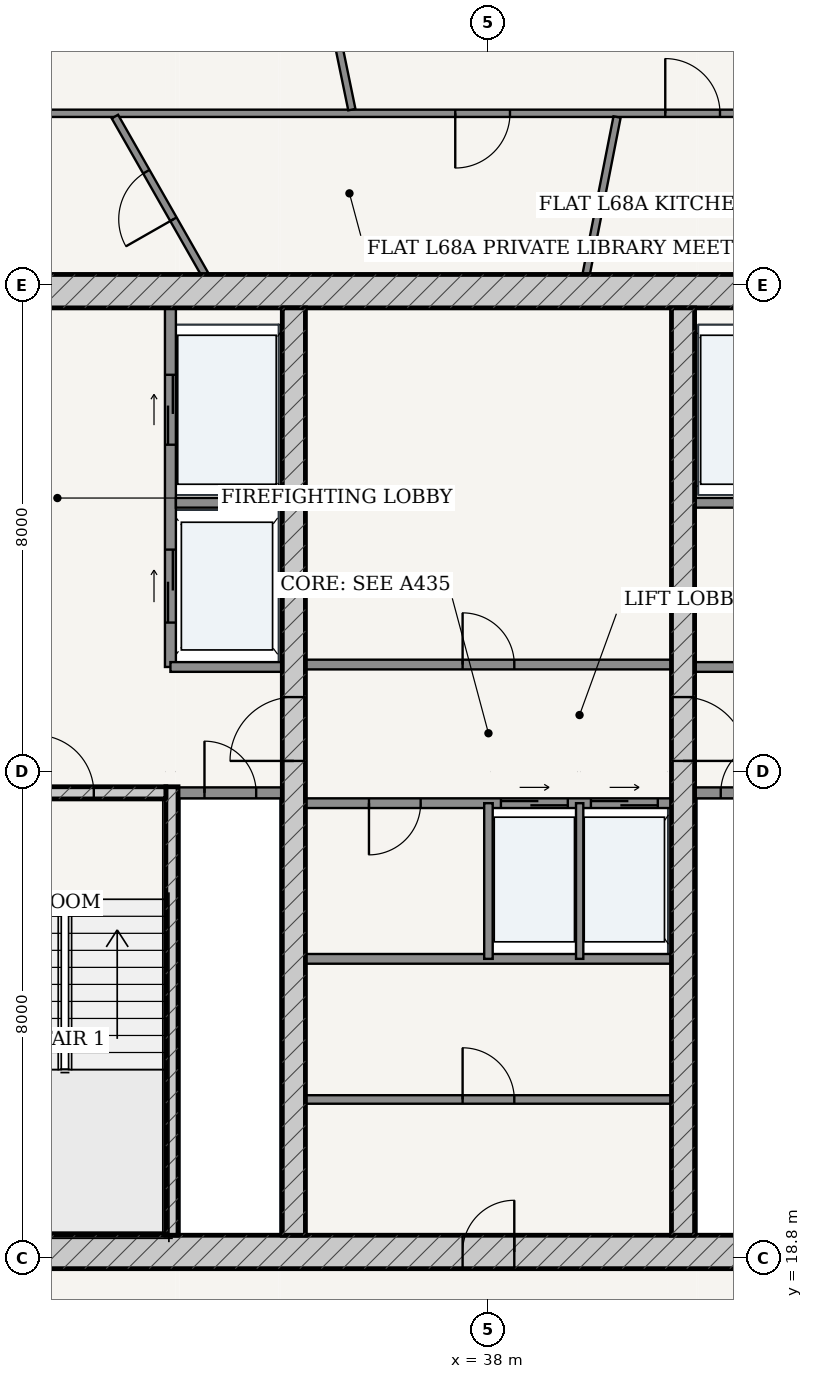
"""IFC4 building model, lengths in metres.
Left out: names, types, materials, properties, quantities, classifications, styles, units other than length and angle.
Written with IfcOpenShell. Run it as: python <this file> out.ifc"""

import sys

from ifc_helpers import new_model, si_unit, direction, frame, frame_2d, origin, place, context, subcontext, project, spatial, rectangle, extrude, source, transform, mapped, element, fill, save


model = new_model("IFC4")
c1 = context("Model", 3, precision=1e-05, world=origin(), true_north=direction((-0.2419218956, 0.970295726276)))
c2 = subcontext(c1, "Body", "Model", "MODEL_VIEW")
j1 = project(units=[si_unit("LENGTHUNIT", "METRE"), si_unit("PLANEANGLEUNIT", "RADIAN")], contexts=[c1])
p1 = place(None, origin())
s1 = spatial("IfcSite", under=j1, at=p1, CompositionType="ELEMENT")
p2 = place(p1, origin())
s2 = spatial("IfcBuilding", under=s1, at=p2, CompositionType="ELEMENT")
p3 = place(p2, frame((0.0, 0.0, 259.45)))
s3 = spatial("IfcBuildingStorey", under=s2, at=p3, CompositionType="ELEMENT", Elevation=259.45)
p4 = place(p3, frame((28.825, 18.9, 0.0), z_axis=(0.0, 0.0, 1.0), x_axis=(1.0, 0.0, 0.0)))
e1 = element("IfcWall", 1, at=p4, inside=s3, PredefinedType="SHEAR", context=c2, shape_type="SweptSolid", body=[
    extrude(rectangle(XDim=18.35, YDim=0.55, at=frame_2d((9.175, 0.0))), origin(), (0.0, 0.0, 1.0), 3.49),
])
p5 = place(p4, frame((8.75, 0.0, 0.0)))
e2 = element("IfcOpeningElement", 2, at=p5, cuts=e1, PredefinedType="OPENING", context=c2, shape_type="SweptSolid", body=[
    extrude(rectangle(XDim=0.85, YDim=2.1, at=frame_2d((0.425, 1.05))), frame((0.0, 0.285, 0.0), z_axis=(0.0, -1.0, 0.0), x_axis=(1.0, 0.0, 0.0)), (0.0, 0.0, 1.0), 0.57),
])
p6 = place(p3, frame((28.825, 34.7, 0.0), z_axis=(0.0, 0.0, 1.0), x_axis=(1.0, 0.0, 0.0)))
e3 = element("IfcWall", 3, at=p6, inside=s3, PredefinedType="SHEAR", context=c2, shape_type="SweptSolid", body=[
    extrude(rectangle(XDim=18.35, YDim=0.55, at=frame_2d((9.175, 0.0))), origin(), (0.0, 0.0, 1.0), 3.49),
])
p7 = place(p3, frame((32.795, 19.175, 0.0), z_axis=(0.0, 0.0, 1.0), x_axis=(0.0, 1.0, 0.0)))
e4 = element("IfcWall", 4, at=p7, inside=s3, PredefinedType="SOLIDWALL", context=c2, shape_type="SweptSolid", body=[
    extrude(rectangle(XDim=7.375, YDim=0.2, at=frame_2d((3.688, 0.0))), origin(), (0.0, 0.0, 1.0), 3.49),
])
p8 = place(p3, frame((29.375, 26.45, 0.0), z_axis=(0.0, 0.0, 1.0), x_axis=(1.0, 0.0, 0.0)))
e5 = element("IfcWall", 5, at=p8, inside=s3, PredefinedType="SOLIDWALL", context=c2, shape_type="SweptSolid", body=[
    extrude(rectangle(XDim=3.32, YDim=0.2, at=frame_2d((1.66, 0.0))), origin(), (0.0, 0.0, 1.0), 3.49),
])
p9 = place(p8, frame((1.185, 0.0, 0.0)))
e6 = element("IfcOpeningElement", 6, at=p9, cuts=e5, PredefinedType="OPENING", context=c2, shape_type="SweptSolid", body=[
    extrude(rectangle(XDim=0.95, YDim=2.15, at=frame_2d((0.475, 1.075))), frame((0.0, 0.11, 0.0), z_axis=(0.0, -1.0, 0.0), x_axis=(1.0, 0.0, 0.0)), (0.0, 0.0, 1.0), 0.22),
])
p10 = place(p3, frame((34.8, 19.175, 0.0), z_axis=(0.0, 0.0, 1.0), x_axis=(0.0, 1.0, 0.0)))
e7 = element("IfcWall", 7, at=p10, inside=s3, PredefinedType="SHEAR", context=c2, shape_type="SweptSolid", body=[
    extrude(rectangle(XDim=15.25, YDim=0.38, at=frame_2d((7.625, 0.0))), origin(), (0.0, 0.0, 1.0), 3.49),
])
p11 = place(p10, frame((7.8, 0.0, 0.0)))
e8 = element("IfcOpeningElement", 8, at=p11, cuts=e7, PredefinedType="OPENING", context=c2, shape_type="SweptSolid", body=[
    extrude(rectangle(XDim=1.05, YDim=2.15, at=frame_2d((0.525, 1.075))), frame((0.0, 0.2, 0.0), z_axis=(0.0, -1.0, 0.0), x_axis=(1.0, 0.0, 0.0)), (0.0, 0.0, 1.0), 0.4),
])
p12 = place(p3, frame((41.2, 19.175, 0.0), z_axis=(0.0, 0.0, 1.0), x_axis=(0.0, 1.0, 0.0)))
e9 = element("IfcWall", 9, at=p12, inside=s3, PredefinedType="SHEAR", context=c2, shape_type="SweptSolid", body=[
    extrude(rectangle(XDim=15.25, YDim=0.38, at=frame_2d((7.625, 0.0))), origin(), (0.0, 0.0, 1.0), 3.49),
])
p13 = place(p12, frame((7.8, 0.0, 0.0)))
e10 = element("IfcOpeningElement", 10, at=p13, cuts=e9, PredefinedType="OPENING", context=c2, shape_type="SweptSolid", body=[
    extrude(rectangle(XDim=1.05, YDim=2.15, at=frame_2d((0.525, 1.075))), frame((0.0, 0.2, 0.0), z_axis=(0.0, -1.0, 0.0), x_axis=(1.0, 0.0, 0.0)), (0.0, 0.0, 1.0), 0.4),
])
p14 = place(p3, frame((32.9, 26.45, 0.0), z_axis=(0.0, 0.0, 1.0), x_axis=(1.0, 0.0, 0.0)))
e11 = element("IfcWall", 11, at=p14, inside=s3, PredefinedType="PARTITIONING", context=c2, shape_type="SweptSolid", body=[
    extrude(rectangle(XDim=1.71, YDim=0.18, at=frame_2d((0.855, 0.0))), origin(), (0.0, 0.0, 1.0), 3.49),
])
p15 = place(p14, frame((0.43, 0.0, 0.0)))
e12 = element("IfcOpeningElement", 12, at=p15, cuts=e11, PredefinedType="OPENING", context=c2, shape_type="SweptSolid", body=[
    extrude(rectangle(XDim=0.85, YDim=2.1, at=frame_2d((0.425, 1.05))), frame((0.0, 0.1, 0.0), z_axis=(0.0, -1.0, 0.0), x_axis=(1.0, 0.0, 0.0)), (0.0, 0.0, 1.0), 0.2),
])
p16 = place(p3, frame((41.39, 26.45, 0.0), z_axis=(0.0, 0.0, 1.0), x_axis=(1.0, 0.0, 0.0)))
e13 = element("IfcWall", 13, at=p16, inside=s3, PredefinedType="PARTITIONING", context=c2, shape_type="SweptSolid", body=[
    extrude(rectangle(XDim=1.71, YDim=0.18, at=frame_2d((0.855, 0.0))), origin(), (0.0, 0.0, 1.0), 3.49),
])
p17 = place(p16, frame((0.43, 0.0, 0.0)))
e14 = element("IfcOpeningElement", 14, at=p17, cuts=e13, PredefinedType="OPENING", context=c2, shape_type="SweptSolid", body=[
    extrude(rectangle(XDim=0.85, YDim=2.1, at=frame_2d((0.425, 1.05))), frame((0.0, 0.1, 0.0), z_axis=(0.0, -1.0, 0.0), x_axis=(1.0, 0.0, 0.0)), (0.0, 0.0, 1.0), 0.2),
])
p18 = place(p3, frame((32.77, 28.52, 0.0), z_axis=(0.0, 0.0, 1.0), x_axis=(0.0, 1.0, 0.0)))
e15 = element("IfcWall", 15, at=p18, inside=s3, PredefinedType="PARTITIONING", context=c2, shape_type="SweptSolid", body=[
    extrude(rectangle(XDim=5.905, YDim=0.18, at=frame_2d((2.953, 0.0))), origin(), (0.0, 0.0, 1.0), 3.49),
])
p19 = place(p18, frame((3.655, 0.0, 0.0)))
e16 = element("IfcOpeningElement", 16, at=p19, cuts=e15, PredefinedType="OPENING", context=c2, shape_type="SweptSolid", body=[
    extrude(rectangle(XDim=1.15, YDim=2.2, at=frame_2d((0.575, 1.1))), frame((0.0, 0.1, 0.0), z_axis=(0.0, -1.0, 0.0), x_axis=(1.0, 0.0, 0.0)), (0.0, 0.0, 1.0), 0.2),
])
p20 = place(p18, frame((0.73, 0.0, 0.0)))
e17 = element("IfcOpeningElement", 17, at=p20, cuts=e15, PredefinedType="OPENING", context=c2, shape_type="SweptSolid", body=[
    extrude(rectangle(XDim=1.2, YDim=2.25, at=frame_2d((0.6, 1.125))), frame((0.0, 0.1, 0.0), z_axis=(0.0, -1.0, 0.0), x_axis=(1.0, 0.0, 0.0)), (0.0, 0.0, 1.0), 0.2),
])
p21 = place(p3, frame((32.86, 31.22, 0.0), z_axis=(0.0, 0.0, 1.0), x_axis=(1.0, 0.0, 0.0)))
e18 = element("IfcWall", 18, at=p21, inside=s3, PredefinedType="PARTITIONING", context=c2, shape_type="SweptSolid", body=[
    extrude(rectangle(XDim=1.75, YDim=0.16, at=frame_2d((0.875, 0.0))), origin(), (0.0, 0.0, 1.0), 3.49),
])
p22 = place(p3, frame((32.77, 28.52, 0.0), z_axis=(0.0, 0.0, 1.0), x_axis=(1.0, 0.0, 0.0)))
e19 = element("IfcWall", 19, at=p22, inside=s3, PredefinedType="PARTITIONING", context=c2, shape_type="SweptSolid", body=[
    extrude(rectangle(XDim=1.84, YDim=0.16, at=frame_2d((0.92, 0.0))), origin(), (0.0, 0.0, 1.0), 3.49),
])
p23 = place(p3, frame((41.39, 31.22, 0.0), z_axis=(0.0, 0.0, 1.0), x_axis=(1.0, 0.0, 0.0)))
e20 = element("IfcWall", 20, at=p23, inside=s3, PredefinedType="PARTITIONING", context=c2, shape_type="SweptSolid", body=[
    extrude(rectangle(XDim=1.75, YDim=0.16, at=frame_2d((0.875, 0.0))), origin(), (0.0, 0.0, 1.0), 3.49),
])
p24 = place(p3, frame((41.39, 28.52, 0.0), z_axis=(0.0, 0.0, 1.0), x_axis=(1.0, 0.0, 0.0)))
e21 = element("IfcWall", 21, at=p24, inside=s3, PredefinedType="PARTITIONING", context=c2, shape_type="SweptSolid", body=[
    extrude(rectangle(XDim=1.84, YDim=0.16, at=frame_2d((0.92, 0.0))), origin(), (0.0, 0.0, 1.0), 3.49),
])
p25 = place(p3, frame((34.99, 28.56, 0.0), z_axis=(0.0, 0.0, 1.0), x_axis=(1.0, 0.0, 0.0)))
e22 = element("IfcWall", 22, at=p25, inside=s3, PredefinedType="PARTITIONING", context=c2, shape_type="SweptSolid", body=[
    extrude(rectangle(XDim=6.02, YDim=0.16, at=frame_2d((3.01, 0.0))), origin(), (0.0, 0.0, 1.0), 3.49),
])
p26 = place(p25, frame((2.585, 0.0, 0.0)))
e23 = element("IfcOpeningElement", 23, at=p26, cuts=e22, PredefinedType="OPENING", context=c2, shape_type="SweptSolid", body=[
    extrude(rectangle(XDim=0.85, YDim=2.1, at=frame_2d((0.425, 1.05))), frame((0.0, 0.09, 0.0), z_axis=(0.0, -1.0, 0.0), x_axis=(1.0, 0.0, 0.0)), (0.0, 0.0, 1.0), 0.18),
])
p27 = place(p3, frame((34.99, 26.28, 0.0), z_axis=(0.0, 0.0, 1.0), x_axis=(1.0, 0.0, 0.0)))
e24 = element("IfcWall", 24, at=p27, inside=s3, PredefinedType="PARTITIONING", context=c2, shape_type="SweptSolid", body=[
    extrude(rectangle(XDim=6.02, YDim=0.16, at=frame_2d((3.01, 0.0))), origin(), (0.0, 0.0, 1.0), 3.49),
])
p28 = place(p27, frame((1.045, 0.0, 0.0)))
e25 = element("IfcOpeningElement", 25, at=p28, cuts=e24, PredefinedType="OPENING", context=c2, shape_type="SweptSolid", body=[
    extrude(rectangle(XDim=0.85, YDim=2.1, at=frame_2d((0.425, 1.05))), frame((0.0, 0.09, 0.0), z_axis=(0.0, -1.0, 0.0), x_axis=(1.0, 0.0, 0.0)), (0.0, 0.0, 1.0), 0.18),
])
p29 = place(p27, frame((3.215, 0.0, 0.0)))
e26 = element("IfcOpeningElement", 26, at=p29, cuts=e24, PredefinedType="OPENING", context=c2, shape_type="SweptSolid", body=[
    extrude(rectangle(XDim=1.1, YDim=2.2, at=frame_2d((0.55, 1.1))), frame((0.0, 0.09, 0.0), z_axis=(0.0, -1.0, 0.0), x_axis=(1.0, 0.0, 0.0)), (0.0, 0.0, 1.0), 0.18),
])
p30 = place(p27, frame((4.695, 0.0, 0.0)))
e27 = element("IfcOpeningElement", 27, at=p30, cuts=e24, PredefinedType="OPENING", context=c2, shape_type="SweptSolid", body=[
    extrude(rectangle(XDim=1.1, YDim=2.2, at=frame_2d((0.55, 1.1))), frame((0.0, 0.09, 0.0), z_axis=(0.0, -1.0, 0.0), x_axis=(1.0, 0.0, 0.0)), (0.0, 0.0, 1.0), 0.18),
])
p31 = place(p3, frame((34.99, 23.72, 0.0), z_axis=(0.0, 0.0, 1.0), x_axis=(1.0, 0.0, 0.0)))
e28 = element("IfcWall", 28, at=p31, inside=s3, PredefinedType="PARTITIONING", context=c2, shape_type="SweptSolid", body=[
    extrude(rectangle(XDim=6.02, YDim=0.16, at=frame_2d((3.01, 0.0))), origin(), (0.0, 0.0, 1.0), 3.49),
])
p32 = place(p3, frame((38.0, 23.72, 0.0), z_axis=(0.0, 0.0, 1.0), x_axis=(0.0, 1.0, 0.0)))
e29 = element("IfcWall", 29, at=p32, inside=s3, PredefinedType="PARTITIONING", context=c2, shape_type="SweptSolid", body=[
    extrude(rectangle(XDim=2.56, YDim=0.14, at=frame_2d((1.28, 0.0))), origin(), (0.0, 0.0, 1.0), 3.49),
])
p33 = place(p3, frame((39.5, 23.72, 0.0), z_axis=(0.0, 0.0, 1.0), x_axis=(0.0, 1.0, 0.0)))
e30 = element("IfcWall", 30, at=p33, inside=s3, PredefinedType="PARTITIONING", context=c2, shape_type="SweptSolid", body=[
    extrude(rectangle(XDim=2.56, YDim=0.12, at=frame_2d((1.28, 0.0))), origin(), (0.0, 0.0, 1.0), 3.49),
])
p34 = place(p3, frame((34.99, 21.407, 0.0), z_axis=(0.0, 0.0, 1.0), x_axis=(1.0, 0.0, 0.0)))
e31 = element("IfcWall", 31, at=p34, inside=s3, PredefinedType="PARTITIONING", context=c2, shape_type="SweptSolid", body=[
    extrude(rectangle(XDim=6.02, YDim=0.14, at=frame_2d((3.01, 0.0))), origin(), (0.0, 0.0, 1.0), 3.49),
])
p35 = place(p34, frame((2.585, 0.0, 0.0)))
e32 = element("IfcOpeningElement", 32, at=p35, cuts=e31, PredefinedType="OPENING", context=c2, shape_type="SweptSolid", body=[
    extrude(rectangle(XDim=0.85, YDim=2.1, at=frame_2d((0.425, 1.05))), frame((0.0, 0.08, 0.0), z_axis=(0.0, -1.0, 0.0), x_axis=(1.0, 0.0, 0.0)), (0.0, 0.0, 1.0), 0.16),
])
p36 = place(p3, frame((26.175, 37.625, 0.0), z_axis=(0.0, 0.0, 1.0), x_axis=(1.0, 0.0, 0.0)))
e33 = element("IfcWall", 33, at=p36, inside=s3, PredefinedType="PARTITIONING", context=c2, shape_type="SweptSolid", body=[
    extrude(rectangle(XDim=23.65, YDim=0.12, at=frame_2d((11.825, 0.0))), origin(), (0.0, 0.0, 1.0), 3.015),
])
p37 = place(p36, frame((14.733, 0.0, 0.0)))
e34 = element("IfcOpeningElement", 34, at=p37, cuts=e33, PredefinedType="OPENING", context=c2, shape_type="SweptSolid", body=[
    extrude(rectangle(XDim=0.9, YDim=2.15, at=frame_2d((0.45, 1.075))), frame((0.0, 0.07, 0.0), z_axis=(0.0, -1.0, 0.0), x_axis=(1.0, 0.0, 0.0)), (0.0, 0.0, 1.0), 0.14),
])
p38 = place(p36, frame((11.279, 0.0, 0.0)))
e35 = element("IfcOpeningElement", 35, at=p38, cuts=e33, PredefinedType="OPENING", context=c2, shape_type="SweptSolid", body=[
    extrude(rectangle(XDim=0.9, YDim=2.15, at=frame_2d((0.45, 1.075))), frame((0.0, 0.07, 0.0), z_axis=(0.0, -1.0, 0.0), x_axis=(1.0, 0.0, 0.0)), (0.0, 0.0, 1.0), 0.14),
])
p39 = place(p36, frame((2.678, 0.0, 0.0)))
e36 = element("IfcOpeningElement", 36, at=p39, cuts=e33, PredefinedType="OPENING", context=c2, shape_type="SweptSolid", body=[
    extrude(rectangle(XDim=0.9, YDim=2.15, at=frame_2d((0.45, 1.075))), frame((0.0, 0.07, 0.0), z_axis=(0.0, -1.0, 0.0), x_axis=(1.0, 0.0, 0.0)), (0.0, 0.0, 1.0), 0.14),
])
p40 = place(p3, frame((35.754, 37.686, 0.0), z_axis=(0.0, 0.0, 1.0), x_axis=(-0.202105877204, 0.979363678313, 0.0)))
e37 = element("IfcWall", 37, at=p40, inside=s3, PredefinedType="PARTITIONING", context=c2, shape_type="SweptSolid", body=[
    extrude(rectangle(XDim=7.512, YDim=0.12, at=frame_2d((3.756, 0.0))), origin(), (0.0, 0.0, 1.0), 3.015),
])
p41 = place(p3, frame((39.607, 34.977, 0.0), z_axis=(0.0, 0.0, 1.0), x_axis=(0.192785105701, 0.981241001497, 0.0)))
e38 = element("IfcWall", 38, at=p41, inside=s3, PredefinedType="PARTITIONING", context=c2, shape_type="SweptSolid", body=[
    extrude(rectangle(XDim=2.637, YDim=0.12, at=frame_2d((1.318, 0.0))), origin(), (0.0, 0.0, 1.0), 2.575),
])
p42 = place(p3, frame((33.336, 34.977, 0.0), z_axis=(0.0, 0.0, 1.0), x_axis=(-0.495399243909, 0.868665406894, 0.0)))
e39 = element("IfcWall", 39, at=p42, inside=s3, PredefinedType="PARTITIONING", context=c2, shape_type="SweptSolid", body=[
    extrude(rectangle(XDim=2.987, YDim=0.12, at=frame_2d((1.493, 0.0))), origin(), (0.0, 0.0, 1.0), 3.49),
])
p43 = place(p42, frame((1.043, 0.0, 0.0)))
e40 = element("IfcOpeningElement", 40, at=p43, cuts=e39, PredefinedType="OPENING", context=c2, shape_type="SweptSolid", body=[
    extrude(rectangle(XDim=0.9, YDim=2.15, at=frame_2d((0.45, 1.075))), frame((0.0, 0.07, 0.0), z_axis=(0.0, -1.0, 0.0), x_axis=(1.0, 0.0, 0.0)), (0.0, 0.0, 1.0), 0.14),
])
m1 = source(origin(), c2, "Body", "SweptSolid", [
    extrude(rectangle(XDim=1.05, YDim=2.15, at=frame_2d((0.525, 1.075))), frame((0.0, 0.025, 0.0), z_axis=(0.0, -1.0, 0.0), x_axis=(1.0, 0.0, 0.0)), (0.0, 0.0, 1.0), 0.05),
])
p44 = place(p11, origin())
e41 = element("IfcDoor", 41, at=p44, inside=s3, OperationType="SINGLE_SWING_LEFT", PredefinedType="DOOR", context=c2, shape_type="MappedRepresentation", body=[
    mapped(m1, transform((0.0, 0.0, 0.0), scale=1.0)),
])
fill(e8, e41)
p45 = place(p13, frame((1.05, 0.0, 0.0), z_axis=(0.0, 0.0, 1.0), x_axis=(-1.0, 0.0, 0.0)))
e42 = element("IfcDoor", 42, at=p45, inside=s3, OperationType="SINGLE_SWING_RIGHT", PredefinedType="DOOR", context=c2, shape_type="MappedRepresentation", body=[
    mapped(m1, transform((0.0, 0.0, 0.0), scale=1.0)),
])
fill(e10, e42)
m2 = source(origin(), c2, "Body", "SweptSolid", [
    extrude(rectangle(XDim=0.95, YDim=2.15, at=frame_2d((0.475, 1.075))), frame((0.0, 0.025, 0.0), z_axis=(0.0, -1.0, 0.0), x_axis=(1.0, 0.0, 0.0)), (0.0, 0.0, 1.0), 0.05),
])
p46 = place(p9, origin())
e43 = element("IfcDoor", 43, at=p46, inside=s3, OperationType="SINGLE_SWING_LEFT", PredefinedType="DOOR", context=c2, shape_type="MappedRepresentation", body=[
    mapped(m2, transform((0.0, 0.0, 0.0), scale=1.0)),
])
fill(e6, e43)
m3 = source(origin(), c2, "Body", "SweptSolid", [
    extrude(rectangle(XDim=0.85, YDim=2.1, at=frame_2d((0.425, 1.05))), frame((0.0, 0.025, 0.0), z_axis=(0.0, -1.0, 0.0), x_axis=(1.0, 0.0, 0.0)), (0.0, 0.0, 1.0), 0.05),
])
p47 = place(p15, origin())
e44 = element("IfcDoor", 44, at=p47, inside=s3, OperationType="SINGLE_SWING_LEFT", PredefinedType="DOOR", context=c2, shape_type="MappedRepresentation", body=[
    mapped(m3, transform((0.0, 0.0, 0.0), scale=1.0)),
])
fill(e12, e44)
p48 = place(p17, origin())
e45 = element("IfcDoor", 45, at=p48, inside=s3, OperationType="SINGLE_SWING_RIGHT", PredefinedType="DOOR", context=c2, shape_type="MappedRepresentation", body=[
    mapped(m3, transform((0.0, 0.0, 0.0), scale=1.0)),
])
fill(e14, e45)
p49 = place(p26, origin())
e46 = element("IfcDoor", 46, at=p49, inside=s3, OperationType="SINGLE_SWING_LEFT", PredefinedType="DOOR", context=c2, shape_type="MappedRepresentation", body=[
    mapped(m3, transform((0.0, 0.0, 0.0), scale=1.0)),
])
fill(e23, e46)
p50 = place(p28, frame((0.85, 0.0, 0.0), z_axis=(0.0, 0.0, 1.0), x_axis=(-1.0, 0.0, 0.0)))
e47 = element("IfcDoor", 47, at=p50, inside=s3, OperationType="SINGLE_SWING_RIGHT", PredefinedType="DOOR", context=c2, shape_type="MappedRepresentation", body=[
    mapped(m3, transform((0.0, 0.0, 0.0), scale=1.0)),
])
fill(e25, e47)
p51 = place(p5, origin())
e48 = element("IfcDoor", 48, at=p51, inside=s3, OperationType="SINGLE_SWING_RIGHT", PredefinedType="DOOR", context=c2, shape_type="MappedRepresentation", body=[
    mapped(m3, transform((0.0, 0.0, 0.0), scale=1.0)),
])
fill(e2, e48)
p52 = place(p35, origin())
e49 = element("IfcDoor", 49, at=p52, inside=s3, OperationType="SINGLE_SWING_LEFT", PredefinedType="DOOR", context=c2, shape_type="MappedRepresentation", body=[
    mapped(m3, transform((0.0, 0.0, 0.0), scale=1.0)),
])
fill(e32, e49)
m4 = source(origin(), c2, "Body", "SweptSolid", [
    extrude(rectangle(XDim=1.15, YDim=2.2, at=frame_2d((0.575, 1.1))), frame((0.0, 0.025, 0.0), z_axis=(0.0, -1.0, 0.0), x_axis=(1.0, 0.0, 0.0)), (0.0, 0.0, 1.0), 0.05),
])
p53 = place(p19, origin())
e50 = element("IfcDoor", 50, at=p53, inside=s3, OperationType="DOUBLE_DOOR_SLIDING", PredefinedType="DOOR", context=c2, shape_type="MappedRepresentation", body=[
    mapped(m4, transform((0.0, 0.0, 0.0), scale=1.0)),
])
fill(e16, e50)
m5 = source(origin(), c2, "Body", "SweptSolid", [
    extrude(rectangle(XDim=1.2, YDim=2.25, at=frame_2d((0.6, 1.125))), frame((0.0, 0.025, 0.0), z_axis=(0.0, -1.0, 0.0), x_axis=(1.0, 0.0, 0.0)), (0.0, 0.0, 1.0), 0.05),
])
p54 = place(p20, origin())
e51 = element("IfcDoor", 51, at=p54, inside=s3, OperationType="DOUBLE_DOOR_SLIDING", PredefinedType="DOOR", context=c2, shape_type="MappedRepresentation", body=[
    mapped(m5, transform((0.0, 0.0, 0.0), scale=1.0)),
])
fill(e17, e51)
m6 = source(origin(), c2, "Body", "SweptSolid", [
    extrude(rectangle(XDim=1.1, YDim=2.2, at=frame_2d((0.55, 1.1))), frame((0.0, 0.025, 0.0), z_axis=(0.0, -1.0, 0.0), x_axis=(1.0, 0.0, 0.0)), (0.0, 0.0, 1.0), 0.05),
])
p55 = place(p29, origin())
e52 = element("IfcDoor", 52, at=p55, inside=s3, OperationType="DOUBLE_DOOR_SLIDING", PredefinedType="DOOR", context=c2, shape_type="MappedRepresentation", body=[
    mapped(m6, transform((0.0, 0.0, 0.0), scale=1.0)),
])
fill(e26, e52)
p56 = place(p30, origin())
e53 = element("IfcDoor", 53, at=p56, inside=s3, OperationType="DOUBLE_DOOR_SLIDING", PredefinedType="DOOR", context=c2, shape_type="MappedRepresentation", body=[
    mapped(m6, transform((0.0, 0.0, 0.0), scale=1.0)),
])
fill(e27, e53)
m7 = source(origin(), c2, "Body", "SweptSolid", [
    extrude(rectangle(XDim=0.9, YDim=2.15, at=frame_2d((0.45, 1.075))), frame((0.0, 0.025, 0.0), z_axis=(0.0, -1.0, 0.0), x_axis=(1.0, 0.0, 0.0)), (0.0, 0.0, 1.0), 0.05),
])
p57 = place(p37, origin())
e54 = element("IfcDoor", 54, at=p57, inside=s3, OperationType="SINGLE_SWING_LEFT", PredefinedType="DOOR", context=c2, shape_type="MappedRepresentation", body=[
    mapped(m7, transform((0.0, 0.0, 0.0), scale=1.0)),
])
fill(e34, e54)
p58 = place(p38, frame((0.9, 0.0, 0.0), z_axis=(0.0, 0.0, 1.0), x_axis=(-1.0, 0.0, 0.0)))
e55 = element("IfcDoor", 55, at=p58, inside=s3, OperationType="SINGLE_SWING_RIGHT", PredefinedType="DOOR", context=c2, shape_type="MappedRepresentation", body=[
    mapped(m7, transform((0.0, 0.0, 0.0), scale=1.0)),
])
fill(e35, e55)
p59 = place(p43, origin())
e56 = element("IfcDoor", 56, at=p59, inside=s3, OperationType="SINGLE_SWING_LEFT", PredefinedType="DOOR", context=c2, shape_type="MappedRepresentation", body=[
    mapped(m7, transform((0.0, 0.0, 0.0), scale=1.0)),
])
fill(e40, e56)
save(model, sys.argv[1])
